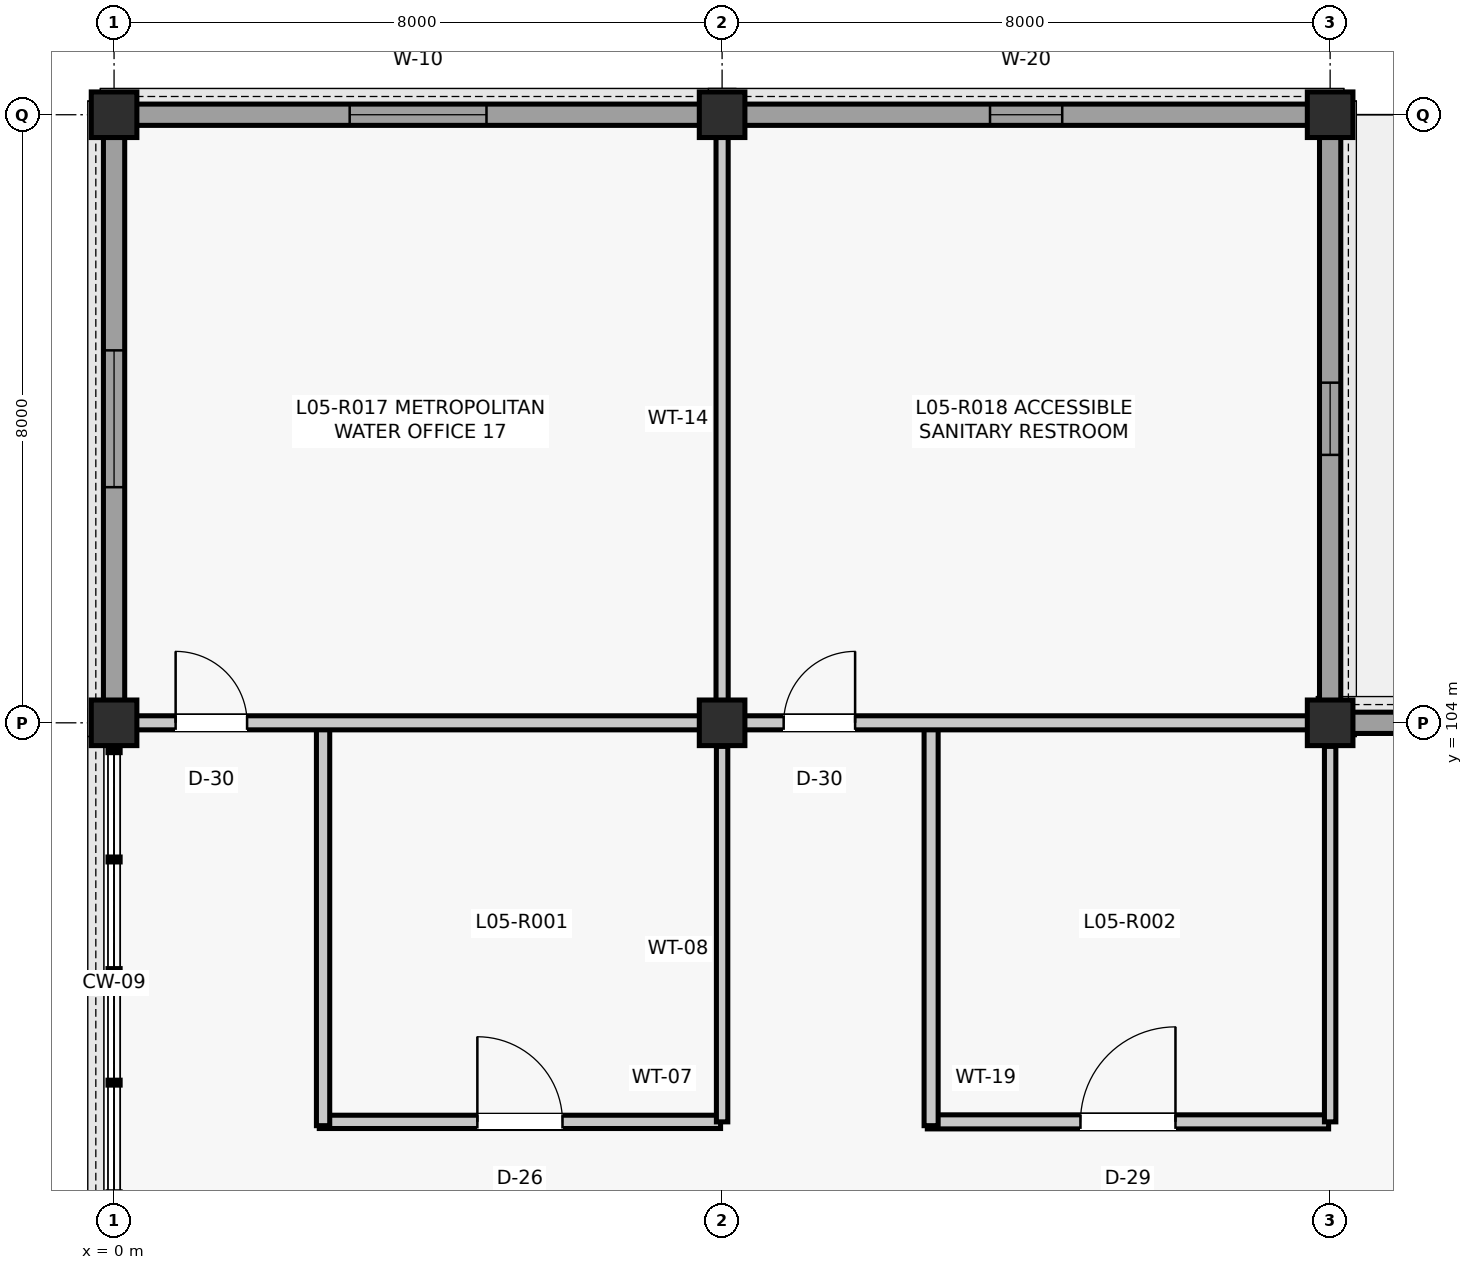
"""IFC4 building model, lengths in metres.
Left out: names, types, materials, properties, quantities, classifications, styles, units other than length and angle.
Written with IfcOpenShell. Run it as: python <this file> out.ifc"""

import sys

from ifc_helpers import new_model, si_unit, direction, frame, frame_2d, origin, origin_2d, place, context, subcontext, project, spatial, rectangle, extrude, element, fill, save


model = new_model("IFC4")
c1 = context("Model", 3, precision=1e-05, world=origin(), true_north=direction((0.0, 1.0)))
c2 = subcontext(c1, "Body", "Model", "MODEL_VIEW")
j1 = project(units=[si_unit("LENGTHUNIT", "METRE"), si_unit("PLANEANGLEUNIT", "RADIAN")], contexts=[c1])
p1 = place(None, origin())
s1 = spatial("IfcSite", under=j1, at=p1, CompositionType="ELEMENT")
p2 = place(p1, origin())
s2 = spatial("IfcBuilding", under=s1, at=p2, CompositionType="ELEMENT")
p3 = place(p2, frame((0.0, 0.0, 21.78)))
s3 = spatial("IfcBuildingStorey", under=s2, at=p3, CompositionType="ELEMENT", Elevation=21.78)
for number, where, z_axis, x_axis in (
    (1, (0.0, 104.0, 0.0), (0.0, 0.0, 1.0), (1.0, 0.0, 0.0)),
    (2, (0.0, 112.0, 0.0), (0.0, 0.0, 1.0), (1.0, 0.0, 0.0)),
    (3, (8.0, 104.0, 0.0), (0.0, 0.0, 1.0), (1.0, 0.0, 0.0)),
    (4, (8.0, 112.0, 0.0), (0.0, 0.0, 1.0), (1.0, 0.0, 0.0)),
    (5, (16.0, 104.0, 0.0), (0.0, 0.0, 1.0), (1.0, 0.0, 0.0)),
    (6, (16.0, 112.0, 0.0), (0.0, 0.0, 1.0), (1.0, 0.0, 0.0)),
):
    element("IfcColumn", number, at=place(p3, frame(where, z_axis=z_axis, x_axis=x_axis)), inside=s3, PredefinedType="COLUMN", context=c2, shape_type="SweptSolid", body=[
        extrude(rectangle(XDim=0.6, YDim=0.6, at=origin_2d()), origin(), (0.0, 0.0, 1.0), 3.96),
    ])
p4 = place(p3, frame((0.285, 112.0, 0.0), z_axis=(0.0, 0.0, 1.0), x_axis=(1.0, 0.0, 0.0)))
e7 = element("IfcWall", 7, at=p4, inside=s3, PredefinedType="SOLIDWALL", context=c2, shape_type="SweptSolid", body=[
    extrude(rectangle(XDim=7.43, YDim=0.28, at=frame_2d((3.715, 0.0))), origin(), (0.0, 0.0, 1.0), 3.372),
])
p5 = place(p4, frame((2.815, 0.0, 0.9)))
e8 = element("IfcOpeningElement", 8, at=p5, cuts=e7, PredefinedType="OPENING", context=c2, shape_type="SweptSolid", body=[
    extrude(rectangle(XDim=1.8, YDim=2.0, at=frame_2d((0.9, 1.0))), frame((0.0, 0.15, 0.0), z_axis=(0.0, -1.0, 0.0), x_axis=(1.0, 0.0, 0.0)), (0.0, 0.0, 1.0), 0.3),
])
p6 = place(p3, frame((0.0, 104.285, 0.0), z_axis=(0.0, 0.0, 1.0), x_axis=(0.0, 1.0, 0.0)))
e9 = element("IfcWall", 9, at=p6, inside=s3, PredefinedType="SOLIDWALL", context=c2, shape_type="SweptSolid", body=[
    extrude(rectangle(XDim=7.43, YDim=0.28, at=frame_2d((3.715, 0.0))), origin(), (0.0, 0.0, 1.0), 3.309),
])
p7 = place(p6, frame((2.815, 0.0, 0.9)))
e10 = element("IfcOpeningElement", 10, at=p7, cuts=e9, PredefinedType="OPENING", context=c2, shape_type="SweptSolid", body=[
    extrude(rectangle(XDim=1.8, YDim=2.0, at=frame_2d((0.9, 1.0))), frame((0.0, 0.15, 0.0), z_axis=(0.0, -1.0, 0.0), x_axis=(1.0, 0.0, 0.0)), (0.0, 0.0, 1.0), 0.3),
])
p8 = place(p3, frame((8.285, 112.0, 0.0), z_axis=(0.0, 0.0, 1.0), x_axis=(1.0, 0.0, 0.0)))
e11 = element("IfcWall", 11, at=p8, inside=s3, PredefinedType="SOLIDWALL", context=c2, shape_type="SweptSolid", body=[
    extrude(rectangle(XDim=7.43, YDim=0.28, at=frame_2d((3.715, 0.0))), origin(), (0.0, 0.0, 1.0), 3.305),
])
p9 = place(p8, frame((3.24, 0.0, 1.35)))
e12 = element("IfcOpeningElement", 12, at=p9, cuts=e11, PredefinedType="OPENING", context=c2, shape_type="SweptSolid", body=[
    extrude(rectangle(XDim=0.95, YDim=1.4, at=frame_2d((0.475, 0.7))), frame((0.0, 0.15, 0.0), z_axis=(0.0, -1.0, 0.0), x_axis=(1.0, 0.0, 0.0)), (0.0, 0.0, 1.0), 0.3),
])
p10 = place(p3, frame((16.0, 104.285, 0.0), z_axis=(0.0, 0.0, 1.0), x_axis=(0.0, 1.0, 0.0)))
e13 = element("IfcWall", 13, at=p10, inside=s3, PredefinedType="SOLIDWALL", context=c2, shape_type="SweptSolid", body=[
    extrude(rectangle(XDim=7.43, YDim=0.28, at=frame_2d((3.715, 0.0))), origin(), (0.0, 0.0, 1.0), 3.259),
])
p11 = place(p10, frame((3.24, 0.0, 1.35)))
e14 = element("IfcOpeningElement", 14, at=p11, cuts=e13, PredefinedType="OPENING", context=c2, shape_type="SweptSolid", body=[
    extrude(rectangle(XDim=0.95, YDim=1.4, at=frame_2d((0.475, 0.7))), frame((0.0, 0.15, 0.0), z_axis=(0.0, -1.0, 0.0), x_axis=(1.0, 0.0, 0.0)), (0.0, 0.0, 1.0), 0.3),
])
p12 = place(p3, frame((16.285, 104.0, 0.0), z_axis=(0.0, 0.0, 1.0), x_axis=(1.0, 0.0, 0.0)))
e15 = element("IfcWall", 15, at=p12, inside=s3, PredefinedType="SOLIDWALL", context=c2, shape_type="SweptSolid", body=[
    extrude(rectangle(XDim=7.43, YDim=0.28, at=frame_2d((3.715, 0.0))), origin(), (0.0, 0.0, 1.0), 3.469),
])
p13 = place(p12, frame((0.662, 0.0, 0.95)))
e16 = element("IfcOpeningElement", 16, at=p13, cuts=e15, PredefinedType="OPENING", context=c2, shape_type="SweptSolid", body=[
    extrude(rectangle(XDim=1.35, YDim=1.9, at=frame_2d((0.675, 0.95))), frame((0.0, 0.15, 0.0), z_axis=(0.0, -1.0, 0.0), x_axis=(1.0, 0.0, 0.0)), (0.0, 0.0, 1.0), 0.3),
])
p14 = place(p12, frame((5.417, 0.0, 0.95)))
e17 = element("IfcOpeningElement", 17, at=p14, cuts=e15, PredefinedType="OPENING", context=c2, shape_type="SweptSolid", body=[
    extrude(rectangle(XDim=1.35, YDim=1.9, at=frame_2d((0.675, 0.95))), frame((0.0, 0.15, 0.0), z_axis=(0.0, -1.0, 0.0), x_axis=(1.0, 0.0, 0.0)), (0.0, 0.0, 1.0), 0.3),
])
p15 = place(p3, frame((2.7, 98.75, 0.0), z_axis=(0.0, 0.0, 1.0), x_axis=(1.0, 0.0, 0.0)))
e18 = element("IfcWall", 18, at=p15, inside=s3, PredefinedType="PARTITIONING", context=c2, shape_type="SweptSolid", body=[
    extrude(rectangle(XDim=5.28, YDim=0.175, at=frame_2d((2.64, 0.0))), origin(), (0.0, 0.0, 1.0), 3.263),
])
p16 = place(p15, frame((2.08, 0.0, 0.0)))
e19 = element("IfcOpeningElement", 19, at=p16, cuts=e18, PredefinedType="OPENING", context=c2, shape_type="SweptSolid", body=[
    extrude(rectangle(XDim=1.12, YDim=2.22, at=frame_2d((0.56, 1.11))), frame((0.0, 0.097, 0.0), z_axis=(0.0, -1.0, 0.0), x_axis=(1.0, 0.0, 0.0)), (0.0, 0.0, 1.0), 0.195),
])
p17 = place(p3, frame((2.75, 98.7, 0.0), z_axis=(0.0, 0.0, 1.0), x_axis=(0.0, 1.0, 0.0)))
e20 = element("IfcWall", 20, at=p17, inside=s3, PredefinedType="PARTITIONING", context=c2, shape_type="SweptSolid", body=[
    extrude(rectangle(XDim=5.28, YDim=0.175, at=frame_2d((2.64, 0.0))), origin(), (0.0, 0.0, 1.0), 3.258),
])
p18 = place(p3, frame((8.0, 98.75, 0.0), z_axis=(0.0, 0.0, 1.0), x_axis=(0.0, 1.0, 0.0)))
e21 = element("IfcWall", 21, at=p18, inside=s3, PredefinedType="PARTITIONING", context=c2, shape_type="SweptSolid", body=[
    extrude(rectangle(XDim=4.94, YDim=0.15, at=frame_2d((2.47, 0.0))), origin(), (0.0, 0.0, 1.0), 3.263),
])
p19 = place(p3, frame((10.7, 98.75, 0.0), z_axis=(0.0, 0.0, 1.0), x_axis=(1.0, 0.0, 0.0)))
e22 = element("IfcWall", 22, at=p19, inside=s3, PredefinedType="PARTITIONING", context=c2, shape_type="SweptSolid", body=[
    extrude(rectangle(XDim=5.28, YDim=0.185, at=frame_2d((2.64, 0.0))), origin(), (0.0, 0.0, 1.0), 3.41),
])
p20 = place(p19, frame((2.015, 0.0, 0.0)))
e23 = element("IfcOpeningElement", 23, at=p20, cuts=e22, PredefinedType="OPENING", context=c2, shape_type="SweptSolid", body=[
    extrude(rectangle(XDim=1.25, YDim=2.18, at=frame_2d((0.625, 1.09))), frame((0.0, 0.103, 0.0), z_axis=(0.0, -1.0, 0.0), x_axis=(1.0, 0.0, 0.0)), (0.0, 0.0, 1.0), 0.205),
])
p21 = place(p3, frame((10.75, 98.7, 0.0), z_axis=(0.0, 0.0, 1.0), x_axis=(0.0, 1.0, 0.0)))
e24 = element("IfcWall", 24, at=p21, inside=s3, PredefinedType="PARTITIONING", context=c2, shape_type="SweptSolid", body=[
    extrude(rectangle(XDim=5.28, YDim=0.185, at=frame_2d((2.64, 0.0))), origin(), (0.0, 0.0, 1.0), 3.251),
])
p22 = place(p3, frame((16.0, 98.75, 0.0), z_axis=(0.0, 0.0, 1.0), x_axis=(0.0, 1.0, 0.0)))
e25 = element("IfcWall", 25, at=p22, inside=s3, PredefinedType="PARTITIONING", context=c2, shape_type="SweptSolid", body=[
    extrude(rectangle(XDim=4.94, YDim=0.15, at=frame_2d((2.47, 0.0))), origin(), (0.0, 0.0, 1.0), 3.462),
])
p23 = place(p3, frame((0.29, 104.0, 0.0), z_axis=(0.0, 0.0, 1.0), x_axis=(1.0, 0.0, 0.0)))
e26 = element("IfcWall", 26, at=p23, inside=s3, PredefinedType="PARTITIONING", context=c2, shape_type="SweptSolid", body=[
    extrude(rectangle(XDim=7.42, YDim=0.185, at=frame_2d((3.71, 0.0))), origin(), (0.0, 0.0, 1.0), 3.258),
])
p24 = place(p23, frame((0.52, 0.0, 0.0)))
e27 = element("IfcOpeningElement", 27, at=p24, cuts=e26, PredefinedType="OPENING", context=c2, shape_type="SweptSolid", body=[
    extrude(rectangle(XDim=0.94, YDim=2.12, at=frame_2d((0.47, 1.06))), frame((0.0, 0.103, 0.0), z_axis=(0.0, -1.0, 0.0), x_axis=(1.0, 0.0, 0.0)), (0.0, 0.0, 1.0), 0.205),
])
p25 = place(p3, frame((8.0, 104.29, 0.0), z_axis=(0.0, 0.0, 1.0), x_axis=(0.0, 1.0, 0.0)))
e28 = element("IfcWall", 28, at=p25, inside=s3, PredefinedType="PARTITIONING", context=c2, shape_type="SweptSolid", body=[
    extrude(rectangle(XDim=7.42, YDim=0.16, at=frame_2d((3.71, 0.0))), origin(), (0.0, 0.0, 1.0), 3.457),
])
p26 = place(p3, frame((8.29, 104.0, 0.0), z_axis=(0.0, 0.0, 1.0), x_axis=(1.0, 0.0, 0.0)))
e29 = element("IfcWall", 29, at=p26, inside=s3, PredefinedType="PARTITIONING", context=c2, shape_type="SweptSolid", body=[
    extrude(rectangle(XDim=7.42, YDim=0.185, at=frame_2d((3.71, 0.0))), origin(), (0.0, 0.0, 1.0), 3.251),
])
p27 = place(p26, frame((0.52, 0.0, 0.0)))
e30 = element("IfcOpeningElement", 30, at=p27, cuts=e29, PredefinedType="OPENING", context=c2, shape_type="SweptSolid", body=[
    extrude(rectangle(XDim=0.94, YDim=2.12, at=frame_2d((0.47, 1.06))), frame((0.0, 0.103, 0.0), z_axis=(0.0, -1.0, 0.0), x_axis=(1.0, 0.0, 0.0)), (0.0, 0.0, 1.0), 0.205),
])
p28 = place(p5, origin())
e31 = element("IfcWindow", 31, at=p28, inside=s3, PartitioningType="SINGLE_PANEL", PredefinedType="WINDOW", context=c2, shape_type="SweptSolid", body=[
    extrude(rectangle(XDim=1.8, YDim=2.0, at=frame_2d((0.9, 1.0))), frame((0.0, 0.03, 0.0), z_axis=(0.0, -1.0, 0.0), x_axis=(1.0, 0.0, 0.0)), (0.0, 0.0, 1.0), 0.06),
])
fill(e8, e31)
p29 = place(p7, origin())
e32 = element("IfcWindow", 32, at=p29, inside=s3, PartitioningType="SINGLE_PANEL", PredefinedType="WINDOW", context=c2, shape_type="SweptSolid", body=[
    extrude(rectangle(XDim=1.8, YDim=2.0, at=frame_2d((0.9, 1.0))), frame((0.0, 0.03, 0.0), z_axis=(0.0, -1.0, 0.0), x_axis=(1.0, 0.0, 0.0)), (0.0, 0.0, 1.0), 0.06),
])
fill(e10, e32)
p30 = place(p9, origin())
e33 = element("IfcWindow", 33, at=p30, inside=s3, PartitioningType="SINGLE_PANEL", PredefinedType="WINDOW", context=c2, shape_type="SweptSolid", body=[
    extrude(rectangle(XDim=0.95, YDim=1.4, at=frame_2d((0.475, 0.7))), frame((0.0, 0.03, 0.0), z_axis=(0.0, -1.0, 0.0), x_axis=(1.0, 0.0, 0.0)), (0.0, 0.0, 1.0), 0.06),
])
fill(e12, e33)
p31 = place(p11, origin())
e34 = element("IfcWindow", 34, at=p31, inside=s3, PartitioningType="SINGLE_PANEL", PredefinedType="WINDOW", context=c2, shape_type="SweptSolid", body=[
    extrude(rectangle(XDim=0.95, YDim=1.4, at=frame_2d((0.475, 0.7))), frame((0.0, 0.03, 0.0), z_axis=(0.0, -1.0, 0.0), x_axis=(1.0, 0.0, 0.0)), (0.0, 0.0, 1.0), 0.06),
])
fill(e14, e34)
p32 = place(p16, origin())
e35 = element("IfcDoor", 35, at=p32, inside=s3, OperationType="SINGLE_SWING_LEFT", PredefinedType="DOOR", context=c2, shape_type="SweptSolid", body=[
    extrude(rectangle(XDim=1.12, YDim=2.22, at=frame_2d((0.56, 1.11))), frame((0.0, 0.025, 0.0), z_axis=(0.0, -1.0, 0.0), x_axis=(1.0, 0.0, 0.0)), (0.0, 0.0, 1.0), 0.05),
])
fill(e19, e35)
p33 = place(p20, origin())
e36 = element("IfcDoor", 36, at=p33, inside=s3, OperationType="SINGLE_SWING_RIGHT", PredefinedType="DOOR", context=c2, shape_type="SweptSolid", body=[
    extrude(rectangle(XDim=1.25, YDim=2.18, at=frame_2d((0.625, 1.09))), frame((0.0, 0.025, 0.0), z_axis=(0.0, -1.0, 0.0), x_axis=(1.0, 0.0, 0.0)), (0.0, 0.0, 1.0), 0.05),
])
fill(e23, e36)
p34 = place(p24, origin())
e37 = element("IfcDoor", 37, at=p34, inside=s3, OperationType="SINGLE_SWING_LEFT", PredefinedType="DOOR", context=c2, shape_type="SweptSolid", body=[
    extrude(rectangle(XDim=0.94, YDim=2.12, at=frame_2d((0.47, 1.06))), frame((0.0, 0.025, 0.0), z_axis=(0.0, -1.0, 0.0), x_axis=(1.0, 0.0, 0.0)), (0.0, 0.0, 1.0), 0.05),
])
fill(e27, e37)
p35 = place(p27, origin())
e38 = element("IfcDoor", 38, at=p35, inside=s3, OperationType="SINGLE_SWING_RIGHT", PredefinedType="DOOR", context=c2, shape_type="SweptSolid", body=[
    extrude(rectangle(XDim=0.94, YDim=2.12, at=frame_2d((0.47, 1.06))), frame((0.0, 0.025, 0.0), z_axis=(0.0, -1.0, 0.0), x_axis=(1.0, 0.0, 0.0)), (0.0, 0.0, 1.0), 0.05),
])
fill(e30, e38)
save(model, sys.argv[1])
